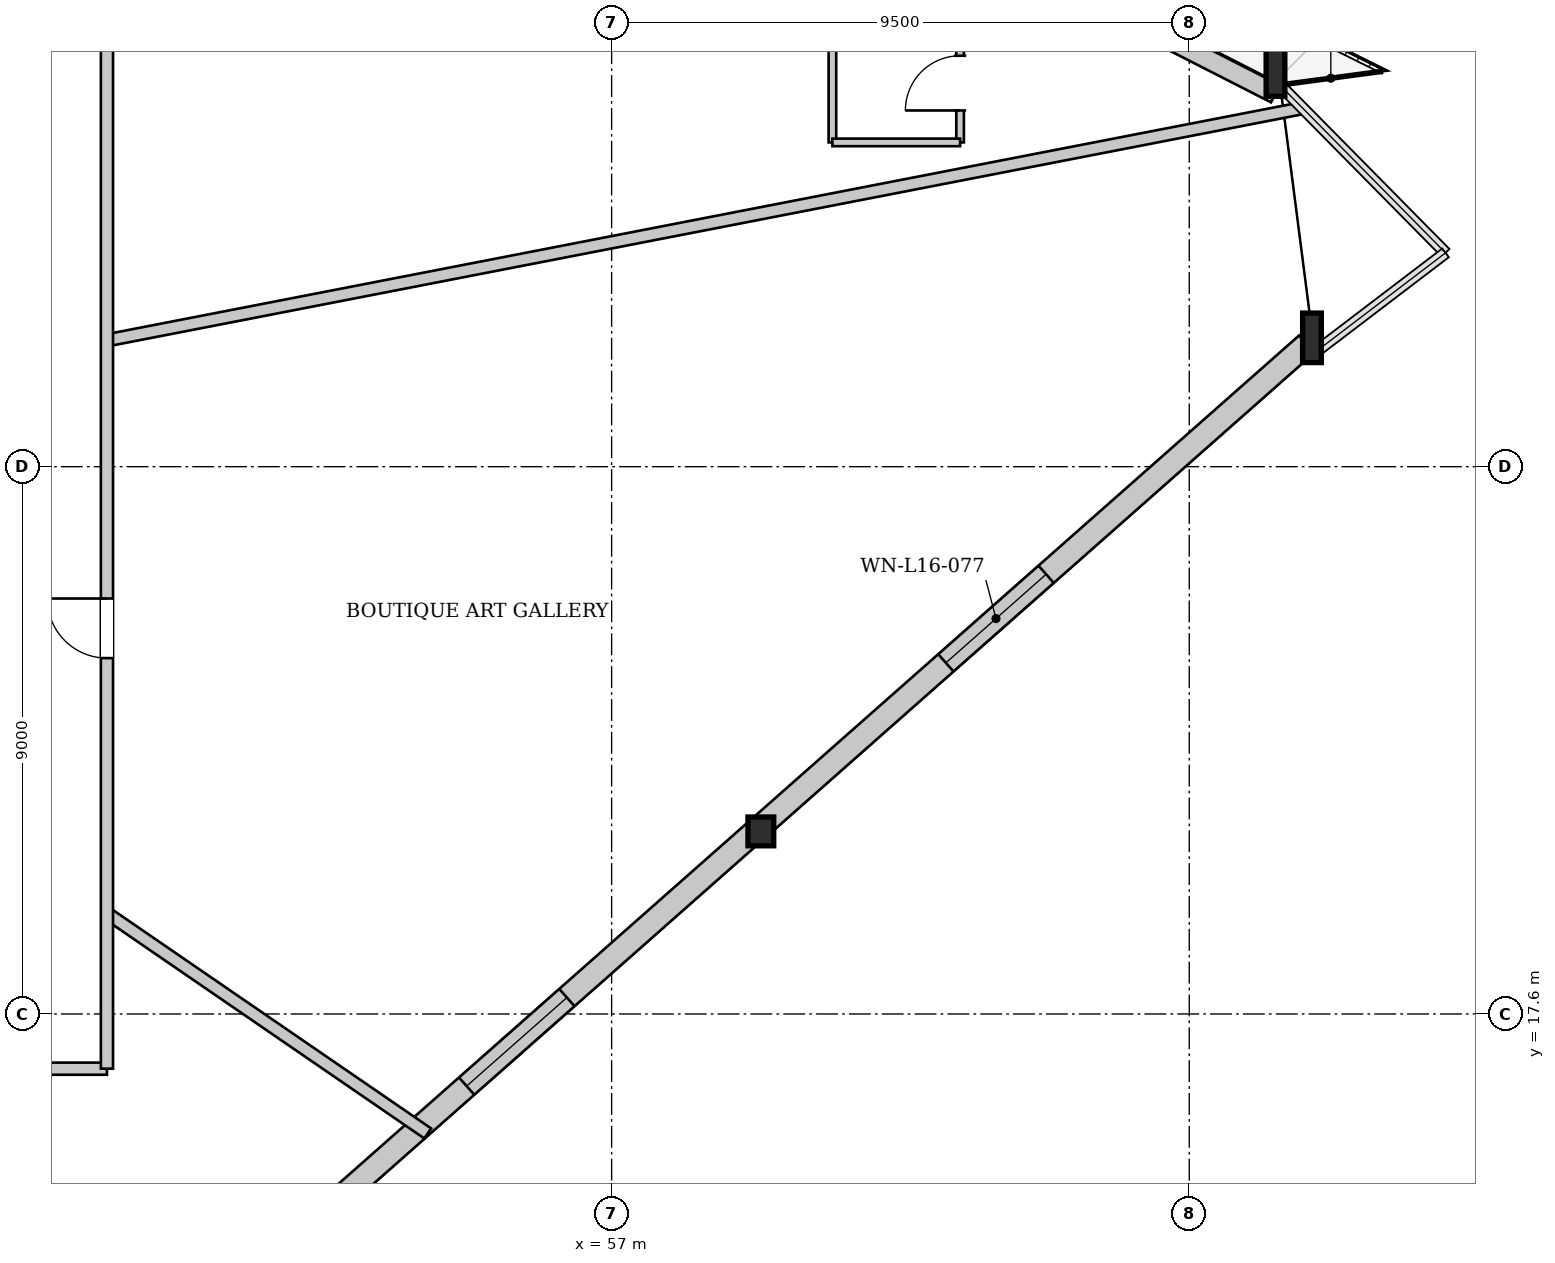
"""IFC4 building model, lengths in metres.
Left out: names, types, materials, properties, quantities, classifications, styles, units other than length and angle.
Written with IfcOpenShell. Run it as: python <this file> out.ifc"""

import sys

from ifc_helpers import new_model, si_unit, direction, frame, frame_2d, origin, origin_2d, place, context, subcontext, project, spatial, rectangle, i_section, extrude, source, transform, mapped, element, fill, save


model = new_model("IFC4")
c1 = context("Model", 3, precision=1e-05, world=origin(), true_north=direction((0.0, 1.0)))
c2 = subcontext(c1, "Body", "Model", "MODEL_VIEW")
j1 = project(units=[si_unit("LENGTHUNIT", "METRE"), si_unit("PLANEANGLEUNIT", "RADIAN")], contexts=[c1])
p1 = place(None, origin())
s1 = spatial("IfcSite", under=j1, at=p1, CompositionType="ELEMENT")
p2 = place(p1, origin())
s2 = spatial("IfcBuilding", under=s1, at=p2, CompositionType="ELEMENT")
p3 = place(p2, frame((0.0, 0.0, 64.8)))
s3 = spatial("IfcBuildingStorey", under=s2, at=p3, CompositionType="ELEMENT", Elevation=64.8)
m1 = source(origin(), c2, "Body", "SweptSolid", [
    extrude(i_section(OverallWidth=0.308, OverallDepth=0.814, WebThickness=0.021, FlangeThickness=0.04, at=origin_2d()), origin(), (0.0, 0.0, 1.0), 3.421),
])
p4 = place(p3, frame((68.558, 28.473, 0.0), z_axis=(-0.023261709787, 0.143780200062, 0.989336215312), x_axis=(-0.987163991357, -0.159709906294, 0.0)))
e1 = element("IfcColumn", 1, at=p4, inside=s3, PredefinedType="COLUMN", context=c2, shape_type="MappedRepresentation", body=[
    mapped(m1, transform((0.0, 0.0, 0.0), x_axis=(1.0, 0.0, 0.0), y_axis=(0.0, 1.0, 0.0), z_axis=(0.0, 0.0, 1.0), scale=1.0)),
])
m2 = source(origin(), c2, "Body", "SweptSolid", [
    extrude(i_section(OverallWidth=0.308, OverallDepth=0.814, WebThickness=0.021, FlangeThickness=0.04, at=origin_2d()), origin(), (0.0, 0.0, 1.0), 3.417),
])
p5 = place(p3, frame((67.99, 32.877, 0.0), z_axis=(-0.041868074629, 0.130105399145, 0.99061579305), x_axis=(-0.951925165949, -0.306330668449, 0.0)))
e2 = element("IfcColumn", 2, at=p5, inside=s3, PredefinedType="COLUMN", context=c2, shape_type="MappedRepresentation", body=[
    mapped(m2, transform((0.0, 0.0, 0.0), x_axis=(1.0, 0.0, 0.0), y_axis=(0.0, 1.0, 0.0), z_axis=(0.0, 0.0, 1.0), scale=1.0)),
])
m3 = source(origin(), c2, "Body", "SweptSolid", [
    extrude(i_section(OverallWidth=0.424, OverallDepth=0.474, WebThickness=0.043, FlangeThickness=0.068, at=origin_2d()), origin(), (0.0, 0.0, 1.0), 3.406),
])
p6 = place(p3, frame((59.432, 20.413, 0.0), z_axis=(0.013331157464, 0.110877960196, 0.993744614166), x_axis=(-0.992849480602, 0.119372982154, 0.0)))
e3 = element("IfcColumn", 3, at=p6, inside=s3, PredefinedType="COLUMN", context=c2, shape_type="MappedRepresentation", body=[
    mapped(m3, transform((0.0, 0.0, 0.0), x_axis=(1.0, 0.0, 0.0), y_axis=(0.0, 1.0, 0.0), z_axis=(0.0, 0.0, 1.0), scale=1.0)),
])
p7 = place(p3, frame((46.771, 43.517, 0.0), z_axis=(0.0, 0.0, 1.0), x_axis=(0.890856769482, -0.454284290141, 0.0)))
e4 = element("IfcWall", 4, at=p7, inside=s3, PredefinedType="SOLIDWALL", context=c2, shape_type="SweptSolid", body=[
    extrude(rectangle(XDim=23.736, YDim=0.32, at=frame_2d((11.868, 0.0))), origin(), (0.0, 0.0, 1.0), 2.592),
])
p8 = place(p7, frame((7.796, 0.0, 0.0)))
e5 = element("IfcOpeningElement", 5, at=p8, cuts=e4, PredefinedType="OPENING", context=c2, shape_type="SweptSolid", body=[
    extrude(rectangle(XDim=1.1, YDim=2.3, at=frame_2d((0.55, 1.15))), frame((0.0, 0.17, 0.0), z_axis=(0.0, -1.0, 0.0), x_axis=(1.0, 0.0, 0.0)), (0.0, 0.0, 1.0), 0.34),
])
p9 = place(p7, frame((16.665, 0.0, 0.272)))
e6 = element("IfcOpeningElement", 6, at=p9, cuts=e4, PredefinedType="OPENING", context=c2, shape_type="SweptSolid", body=[
    extrude(rectangle(XDim=1.8, YDim=2.2, at=frame_2d((0.9, 1.1))), frame((0.0, 0.17, 0.0), z_axis=(0.0, -1.0, 0.0), x_axis=(1.0, 0.0, 0.0)), (0.0, 0.0, 1.0), 0.34),
])
p10 = place(p3, frame((68.432, 28.615, 0.0), z_axis=(0.0, 0.0, 1.0), x_axis=(-0.749537297232, -0.661962113763, 0.0)))
e7 = element("IfcWall", 7, at=p10, inside=s3, PredefinedType="SOLIDWALL", context=c2, shape_type="SweptSolid", body=[
    extrude(rectangle(XDim=24.351, YDim=0.38, at=frame_2d((12.176, 0.0))), origin(), (0.0, 0.0, 1.0), 2.592),
])
p11 = place(p10, frame((5.718, 0.0, 0.222)))
e8 = element("IfcOpeningElement", 8, at=p11, cuts=e7, PredefinedType="OPENING", context=c2, shape_type="SweptSolid", body=[
    extrude(rectangle(XDim=2.2, YDim=2.25, at=frame_2d((1.1, 1.125))), frame((0.0, 0.2, 0.0), z_axis=(0.0, -1.0, 0.0), x_axis=(1.0, 0.0, 0.0)), (0.0, 0.0, 1.0), 0.4),
])
p12 = place(p10, frame((16.233, 0.0, 0.222)))
e9 = element("IfcOpeningElement", 9, at=p12, cuts=e7, PredefinedType="OPENING", context=c2, shape_type="SweptSolid", body=[
    extrude(rectangle(XDim=2.2, YDim=2.25, at=frame_2d((1.1, 1.125))), frame((0.0, 0.2, 0.0), z_axis=(0.0, -1.0, 0.0), x_axis=(1.0, 0.0, 0.0)), (0.0, 0.0, 1.0), 0.4),
])
p13 = place(p3, frame((48.7, 19.256, 0.0), z_axis=(0.0, 0.0, 1.0), x_axis=(0.824484731909, -0.565884199152, 0.0)))
e10 = element("IfcWall", 10, at=p13, inside=s3, PredefinedType="PARTITIONING", context=c2, shape_type="SweptSolid", body=[
    extrude(rectangle(XDim=6.399, YDim=0.2, at=frame_2d((3.199, 0.0))), origin(), (0.0, 0.0, 1.0), 3.3),
])
p14 = place(p3, frame((48.7, 28.678, 0.0), z_axis=(0.0, 0.0, 1.0), x_axis=(0.981655464167, 0.190663446082, 0.0)))
e11 = element("IfcWall", 11, at=p14, inside=s3, PredefinedType="PARTITIONING", context=c2, shape_type="SweptSolid", body=[
    extrude(rectangle(XDim=19.996, YDim=0.2, at=frame_2d((9.998, 0.0))), origin(), (0.0, 0.0, 1.0), 3.3),
])
p15 = place(p3, frame((62.731, 31.933, 0.0), z_axis=(0.0, 0.0, 1.0), x_axis=(0.0, 1.0, 0.0)))
e12 = element("IfcWall", 12, at=p15, inside=s3, PredefinedType="PARTITIONING", context=c2, shape_type="SweptSolid", body=[
    extrude(rectangle(XDim=1.95, YDim=0.125, at=frame_2d((0.975, 0.0))), origin(), (0.0, 0.0, 1.0), 3.3),
])
p16 = place(p15, frame((0.525, 0.0, 0.0)))
e13 = element("IfcOpeningElement", 13, at=p16, cuts=e12, PredefinedType="OPENING", context=c2, shape_type="SweptSolid", body=[
    extrude(rectangle(XDim=0.9, YDim=2.1, at=frame_2d((0.45, 1.05))), frame((0.0, 0.073, 0.0), z_axis=(0.0, -1.0, 0.0), x_axis=(1.0, 0.0, 0.0)), (0.0, 0.0, 1.0), 0.145),
])
p17 = place(p3, frame((60.631, 33.883, 0.0), z_axis=(0.0, 0.0, 1.0), x_axis=(0.0, -1.0, 0.0)))
e14 = element("IfcWall", 14, at=p17, inside=s3, PredefinedType="PARTITIONING", context=c2, shape_type="SweptSolid", body=[
    extrude(rectangle(XDim=1.95, YDim=0.125, at=frame_2d((0.975, 0.0))), origin(), (0.0, 0.0, 1.0), 3.3),
])
p18 = place(p3, frame((60.631, 31.933, 0.0), z_axis=(0.0, 0.0, 1.0), x_axis=(1.0, 0.0, 0.0)))
e15 = element("IfcWall", 15, at=p18, inside=s3, PredefinedType="PARTITIONING", context=c2, shape_type="SweptSolid", body=[
    extrude(rectangle(XDim=2.1, YDim=0.125, at=frame_2d((1.05, 0.0))), origin(), (0.0, 0.0, 1.0), 2.795),
])
p19 = place(p3, frame((27.3, 16.7, 0.0), z_axis=(0.0, 0.0, 1.0), x_axis=(1.0, 0.0, 0.0)))
e16 = element("IfcWall", 16, at=p19, inside=s3, PredefinedType="PARTITIONING", context=c2, shape_type="SweptSolid", body=[
    extrude(rectangle(XDim=21.4, YDim=0.2, at=frame_2d((10.7, 0.0))), origin(), (0.0, 0.0, 1.0), 3.3),
])
p20 = place(p19, frame((7.0, 0.0, 0.0)))
e17 = element("IfcOpeningElement", 17, at=p20, cuts=e16, PredefinedType="OPENING", context=c2, shape_type="SweptSolid", body=[
    extrude(rectangle(XDim=0.98, YDim=2.15, at=frame_2d((0.49, 1.075))), frame((0.0, 0.11, 0.0), z_axis=(0.0, -1.0, 0.0), x_axis=(1.0, 0.0, 0.0)), (0.0, 0.0, 1.0), 0.22),
])
p21 = place(p19, frame((17.868, 0.0, 0.0)))
e18 = element("IfcOpeningElement", 18, at=p21, cuts=e16, PredefinedType="OPENING", context=c2, shape_type="SweptSolid", body=[
    extrude(rectangle(XDim=0.98, YDim=2.15, at=frame_2d((0.49, 1.075))), frame((0.0, 0.11, 0.0), z_axis=(0.0, -1.0, 0.0), x_axis=(1.0, 0.0, 0.0)), (0.0, 0.0, 1.0), 0.22),
])
p22 = place(p3, frame((48.7, 16.7, 0.0), z_axis=(0.0, 0.0, 1.0), x_axis=(0.0, 1.0, 0.0)))
e19 = element("IfcWall", 19, at=p22, inside=s3, PredefinedType="PARTITIONING", context=c2, shape_type="SweptSolid", body=[
    extrude(rectangle(XDim=19.8, YDim=0.2, at=frame_2d((9.9, 0.0))), origin(), (0.0, 0.0, 1.0), 3.3),
])
p23 = place(p22, frame((6.752, 0.0, 0.0)))
e20 = element("IfcOpeningElement", 20, at=p23, cuts=e19, PredefinedType="OPENING", context=c2, shape_type="SweptSolid", body=[
    extrude(rectangle(XDim=0.98, YDim=2.15, at=frame_2d((0.49, 1.075))), frame((0.0, 0.11, 0.0), z_axis=(0.0, -1.0, 0.0), x_axis=(1.0, 0.0, 0.0)), (0.0, 0.0, 1.0), 0.22),
])
p24 = place(p22, frame((17.487, 0.0, 0.0)))
e21 = element("IfcOpeningElement", 21, at=p24, cuts=e19, PredefinedType="OPENING", context=c2, shape_type="SweptSolid", body=[
    extrude(rectangle(XDim=0.98, YDim=2.15, at=frame_2d((0.49, 1.075))), frame((0.0, 0.11, 0.0), z_axis=(0.0, -1.0, 0.0), x_axis=(1.0, 0.0, 0.0)), (0.0, 0.0, 1.0), 0.22),
])
m4 = source(origin(), c2, "Body", "SweptSolid", [
    extrude(rectangle(XDim=2.2, YDim=2.25, at=frame_2d((1.1, 1.125))), frame((0.0, 0.03, 0.0), z_axis=(0.0, -1.0, 0.0), x_axis=(1.0, 0.0, 0.0)), (0.0, 0.0, 1.0), 0.06),
])
p25 = place(p11, origin())
e22 = element("IfcWindow", 22, at=p25, inside=s3, PartitioningType="SINGLE_PANEL", PredefinedType="WINDOW", context=c2, shape_type="MappedRepresentation", body=[
    mapped(m4, transform((0.0, 0.0, 0.0), x_axis=(1.0, 0.0, 0.0), y_axis=(0.0, 1.0, 0.0), z_axis=(0.0, 0.0, 1.0), scale=1.0)),
])
fill(e8, e22)
p26 = place(p12, origin())
e23 = element("IfcWindow", 23, at=p26, inside=s3, PartitioningType="SINGLE_PANEL", PredefinedType="WINDOW", context=c2, shape_type="MappedRepresentation", body=[
    mapped(m4, transform((0.0, 0.0, 0.0), x_axis=(1.0, 0.0, 0.0), y_axis=(0.0, 1.0, 0.0), z_axis=(0.0, 0.0, 1.0), scale=1.0)),
])
fill(e9, e23)
m5 = source(origin(), c2, "Body", "SweptSolid", [
    extrude(rectangle(XDim=0.9, YDim=2.1, at=frame_2d((0.45, 1.05))), frame((0.0, 0.025, 0.0), z_axis=(0.0, -1.0, 0.0), x_axis=(1.0, 0.0, 0.0)), (0.0, 0.0, 1.0), 0.05),
])
p27 = place(p16, origin())
e24 = element("IfcDoor", 24, at=p27, inside=s3, OperationType="SINGLE_SWING_LEFT", PredefinedType="DOOR", context=c2, shape_type="MappedRepresentation", body=[
    mapped(m5, transform((0.0, 0.0, 0.0), x_axis=(1.0, 0.0, 0.0), y_axis=(0.0, 1.0, 0.0), z_axis=(0.0, 0.0, 1.0), scale=1.0)),
])
fill(e13, e24)
m6 = source(origin(), c2, "Body", "SweptSolid", [
    extrude(rectangle(XDim=0.98, YDim=2.15, at=frame_2d((0.49, 1.075))), frame((0.0, 0.025, 0.0), z_axis=(0.0, -1.0, 0.0), x_axis=(1.0, 0.0, 0.0)), (0.0, 0.0, 1.0), 0.05),
])
p28 = place(p23, origin())
e25 = element("IfcDoor", 25, at=p28, inside=s3, OperationType="SINGLE_SWING_RIGHT", PredefinedType="DOOR", context=c2, shape_type="MappedRepresentation", body=[
    mapped(m6, transform((0.0, 0.0, 0.0), x_axis=(1.0, 0.0, 0.0), y_axis=(0.0, 1.0, 0.0), z_axis=(0.0, 0.0, 1.0), scale=1.0)),
])
fill(e20, e25)
save(model, sys.argv[1])
